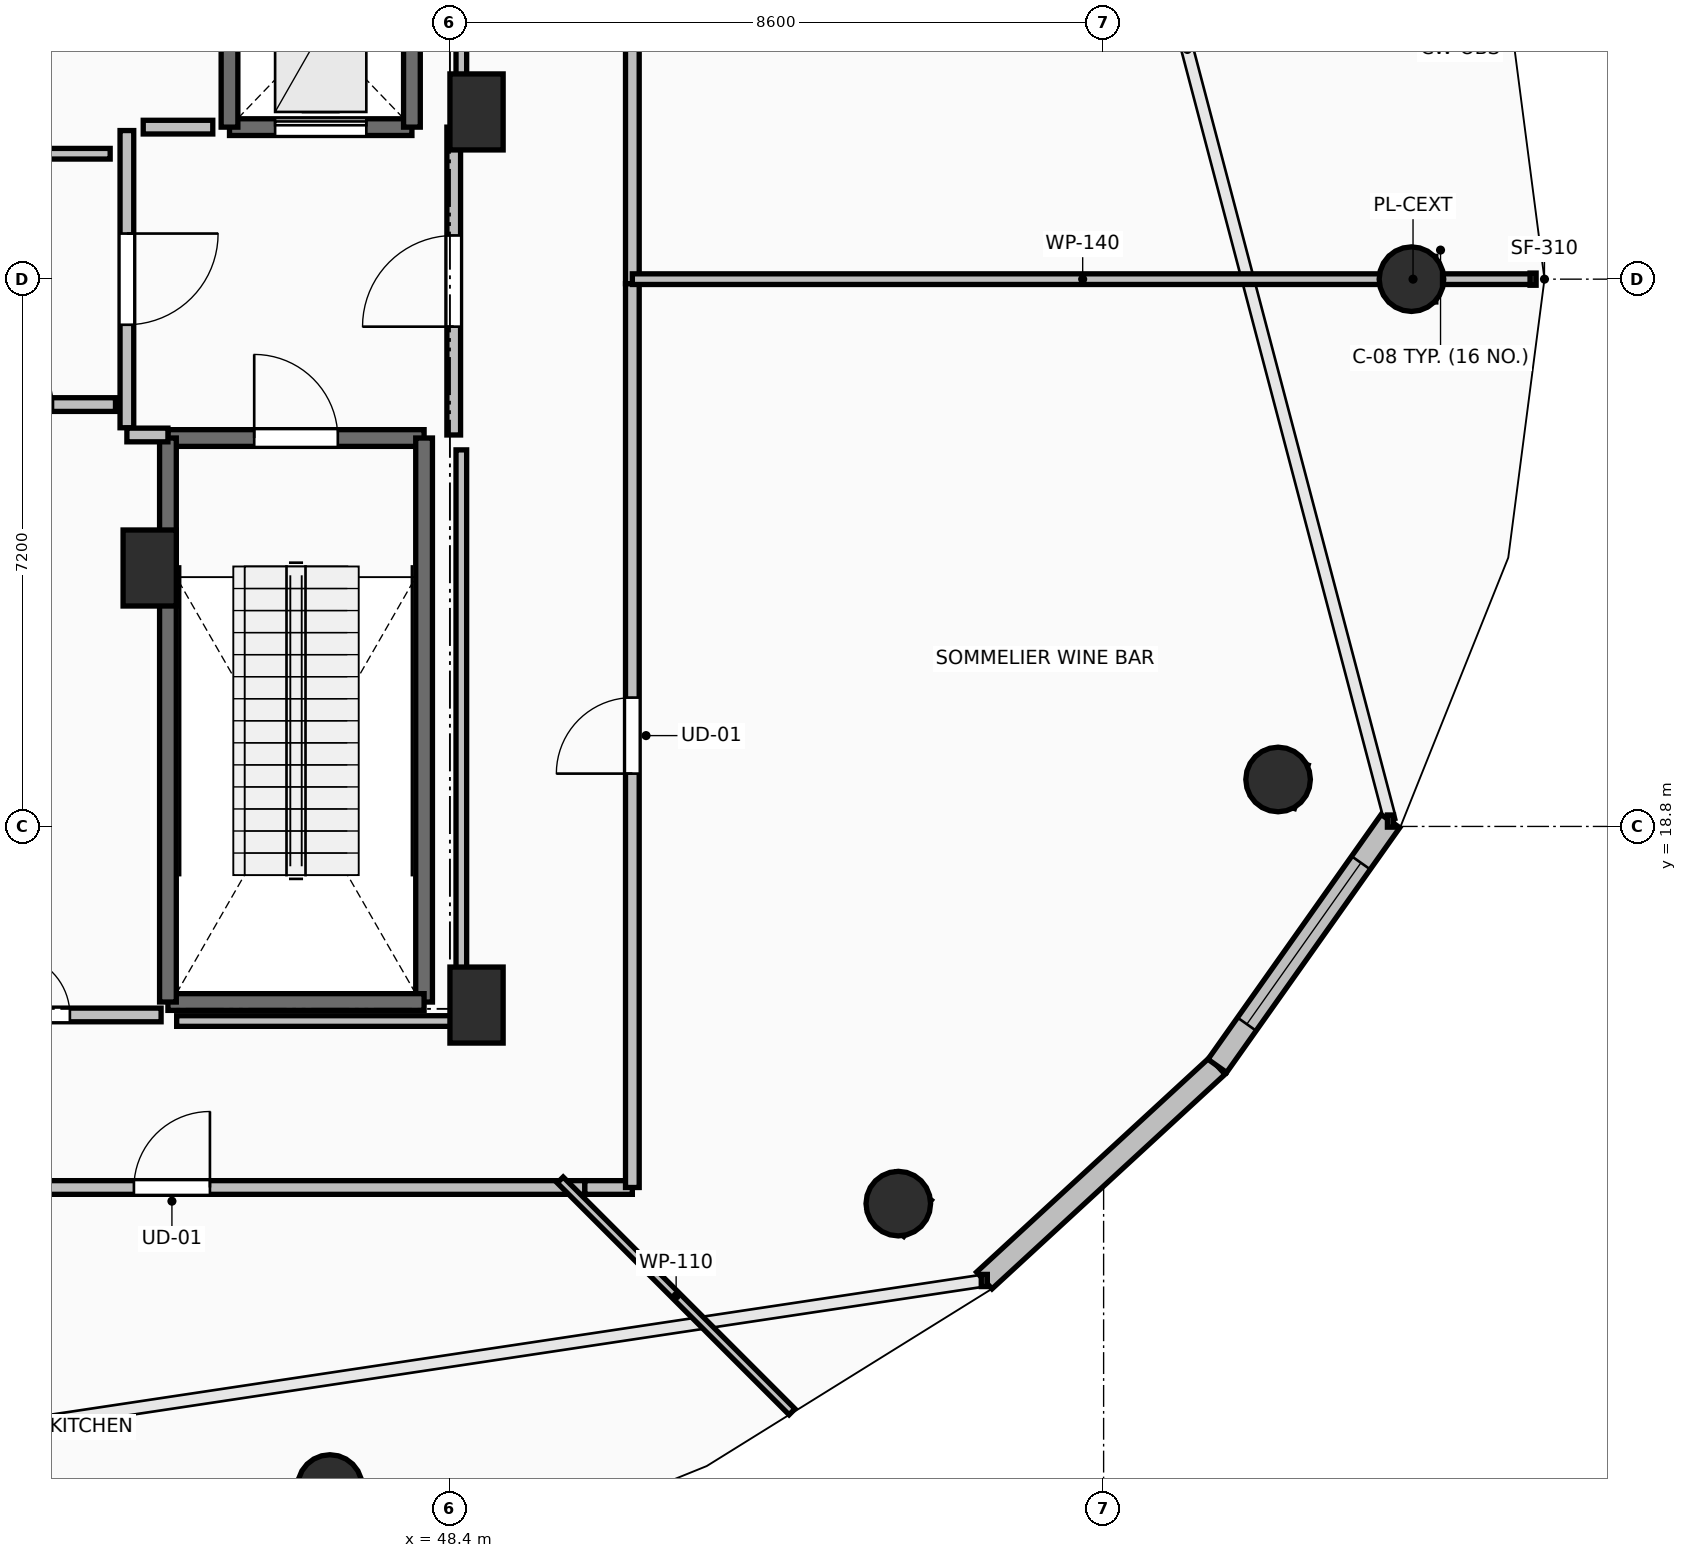
"""IFC4 building model, lengths in metres.
Left out: names, types, materials, properties, quantities, classifications, styles, units other than length and angle.
Written with IfcOpenShell. Run it as: python <this file> out.ifc"""

import sys

from ifc_helpers import new_model, si_unit, direction, frame, frame_2d, origin, origin_2d, place, context, subcontext, project, spatial, rectangle, circle, extrude, element, fill, save


model = new_model("IFC4")
c1 = context("Model", 3, precision=1e-05, world=origin(), true_north=direction((0.0, 1.0)))
c2 = subcontext(c1, "Body", "Model", "MODEL_VIEW")
j1 = project(units=[si_unit("LENGTHUNIT", "METRE"), si_unit("PLANEANGLEUNIT", "RADIAN")], contexts=[c1])
p1 = place(None, origin())
s1 = spatial("IfcSite", under=j1, at=p1, CompositionType="ELEMENT")
p2 = place(p1, origin())
s2 = spatial("IfcBuilding", under=s1, at=p2, CompositionType="ELEMENT")
p3 = place(p2, frame((0.0, 0.0, 290.4)))
s3 = spatial("IfcBuildingStorey", under=s2, at=p3, CompositionType="ELEMENT", Elevation=290.4)
for number, where, z_axis, x_axis in (
    (1, (61.05, 26.0, 0.0), (0.0, 0.0, 1.0), (1.0, 0.0, 0.0)),
    (2, (46.821, 10.109, 0.0), (0.0, 0.0, 1.0), (0.383, -0.924, 0.0)),
    (3, (54.299, 13.838, 0.0), (0.0, 0.0, 1.0), (0.707, -0.707, 0.0)),
    (4, (59.295, 19.418, 0.0), (0.0, 0.0, 1.0), (0.924, -0.383, 0.0)),
):
    element("IfcColumn", number, at=place(p3, frame(where, z_axis=z_axis, x_axis=x_axis)), inside=s3, PredefinedType="COLUMN", context=c2, shape_type="SweptSolid", body=[
        extrude(circle(Radius=0.425, at=origin_2d()), origin(), (0.0, 0.0, 1.0), 5.0),
    ])
for number, where, z_axis, x_axis in (
    (5, (48.75, 28.2, 0.0), (0.0, 0.0, 1.0), (1.0, 0.0, 0.0)),
    (6, (48.75, 16.45, 0.0), (0.0, 0.0, 1.0), (1.0, 0.0, 0.0)),
    (7, (44.45, 22.2, 0.0), (0.0, 0.0, 1.0), (1.0, 0.0, 0.0)),
):
    element("IfcColumn", number, at=place(p3, frame(where, z_axis=z_axis, x_axis=x_axis)), inside=s3, PredefinedType="PILASTER", context=c2, shape_type="SweptSolid", body=[
        extrude(rectangle(XDim=0.7, YDim=1.0, at=origin_2d()), origin(), (0.0, 0.0, 1.0), 5.0),
    ])
p4 = place(p3, frame((55.43, 12.827, 0.0), z_axis=(0.0, 0.0, 1.0), x_axis=(0.735595808164, 0.677420701641, 0.0)))
e8 = element("IfcWall", 8, at=p4, inside=s3, PredefinedType="STANDARD", context=c2, shape_type="SweptSolid", body=[
    extrude(rectangle(XDim=4.167, YDim=0.3, at=frame_2d((2.083, 0.0))), origin(), (0.0, 0.0, 1.0), 4.72),
])
p5 = place(p3, frame((58.496, 15.65, 0.0), z_axis=(0.0, 0.0, 1.0), x_axis=(0.577438563223, 0.816434140457, 0.0)))
e9 = element("IfcWall", 9, at=p5, inside=s3, PredefinedType="STANDARD", context=c2, shape_type="SweptSolid", body=[
    extrude(rectangle(XDim=3.945, YDim=0.3, at=frame_2d((1.973, 0.0))), origin(), (0.0, 0.0, 1.0), 4.72),
])
p6 = place(p5, frame((0.673, 0.0, 0.85)))
e10 = element("IfcOpeningElement", 10, at=p6, cuts=e9, PredefinedType="OPENING", context=c2, shape_type="SweptSolid", body=[
    extrude(rectangle(XDim=2.6, YDim=2.5, at=frame_2d((1.3, 1.25))), frame((0.0, 0.165, 0.0), z_axis=(0.0, -1.0, 0.0), x_axis=(1.0, 0.0, 0.0)), (0.0, 0.0, 1.0), 0.33),
])
p7 = place(p3, frame((44.69, 23.91, 0.0), z_axis=(0.0, 0.0, 1.0), x_axis=(1.0, 0.0, 0.0)))
e11 = element("IfcWall", 11, at=p7, inside=s3, PredefinedType="SOLIDWALL", context=c2, shape_type="SweptSolid", body=[
    extrude(rectangle(XDim=3.37, YDim=0.22, at=frame_2d((1.685, 0.0))), origin(), (0.0, 0.0, 1.0), 4.72),
])
p8 = place(p7, frame((1.135, 0.0, 0.0)))
e12 = element("IfcOpeningElement", 12, at=p8, cuts=e11, PredefinedType="OPENING", context=c2, shape_type="SweptSolid", body=[
    extrude(rectangle(XDim=1.1, YDim=2.15, at=frame_2d((0.55, 1.075))), frame((0.0, 0.125, 0.0), z_axis=(0.0, -1.0, 0.0), x_axis=(1.0, 0.0, 0.0)), (0.0, 0.0, 1.0), 0.25),
])
p9 = place(p3, frame((48.06, 23.91, 0.0), z_axis=(0.0, 0.0, 1.0), x_axis=(0.0, -1.0, 0.0)))
e13 = element("IfcWall", 13, at=p9, inside=s3, PredefinedType="SOLIDWALL", context=c2, shape_type="SweptSolid", body=[
    extrude(rectangle(XDim=7.42, YDim=0.22, at=frame_2d((3.71, 0.0))), origin(), (0.0, 0.0, 1.0), 4.72),
])
p10 = place(p3, frame((48.06, 16.49, 0.0), z_axis=(0.0, 0.0, 1.0), x_axis=(-1.0, 0.0, 0.0)))
e14 = element("IfcWall", 14, at=p10, inside=s3, PredefinedType="SOLIDWALL", context=c2, shape_type="SweptSolid", body=[
    extrude(rectangle(XDim=3.37, YDim=0.22, at=frame_2d((1.685, 0.0))), origin(), (0.0, 0.0, 1.0), 4.72),
])
p11 = place(p3, frame((44.69, 16.49, 0.0), z_axis=(0.0, 0.0, 1.0), x_axis=(0.0, 1.0, 0.0)))
e15 = element("IfcWall", 15, at=p11, inside=s3, PredefinedType="SOLIDWALL", context=c2, shape_type="SweptSolid", body=[
    extrude(rectangle(XDim=7.42, YDim=0.22, at=frame_2d((3.71, 0.0))), origin(), (0.0, 0.0, 1.0), 4.72),
])
p12 = place(p3, frame((45.5, 28.0, 0.0), z_axis=(0.0, 0.0, 1.0), x_axis=(1.0, 0.0, 0.0)))
e16 = element("IfcWall", 16, at=p12, inside=s3, PredefinedType="SHEAR", context=c2, shape_type="SweptSolid", body=[
    extrude(rectangle(XDim=2.4, YDim=0.22, at=frame_2d((1.2, 0.0))), origin(), (0.0, 0.0, 1.0), 4.72),
])
p13 = place(p12, frame((0.6, 0.0, 0.0)))
e17 = element("IfcOpeningElement", 17, at=p13, cuts=e16, PredefinedType="OPENING", context=c2, shape_type="SweptSolid", body=[
    extrude(rectangle(XDim=1.2, YDim=2.2, at=frame_2d((0.6, 1.1))), frame((0.0, 0.125, 0.0), z_axis=(0.0, -1.0, 0.0), x_axis=(1.0, 0.0, 0.0)), (0.0, 0.0, 1.0), 0.25),
])
for number, where, z_axis, x_axis in (
    (18, (47.9, 28.0, 0.0), (0.0, 0.0, 1.0), (0.0, 1.0, 0.0)),
    (19, (45.5, 30.5, 0.0), (0.0, 0.0, 1.0), (0.0, -1.0, 0.0)),
):
    element("IfcWall", number, at=place(p3, frame(where, z_axis=z_axis, x_axis=x_axis)), inside=s3, PredefinedType="SHEAR", context=c2, shape_type="SweptSolid", body=[
        extrude(rectangle(XDim=2.5, YDim=0.22, at=frame_2d((1.25, 0.0))), origin(), (0.0, 0.0, 1.0), 4.72),
    ])
p14 = place(p3, frame((44.15, 27.955, 0.0), z_axis=(0.0, 0.0, 1.0), x_axis=(0.0, -1.0, 0.0)))
e20 = element("IfcWall", 20, at=p14, inside=s3, PredefinedType="PARTITIONING", context=c2, shape_type="SweptSolid", body=[
    extrude(rectangle(XDim=3.91, YDim=0.18, at=frame_2d((1.955, 0.0))), origin(), (0.0, 0.0, 1.0), 4.72),
])
p15 = place(p14, frame((1.355, 0.0, 0.0)))
e21 = element("IfcOpeningElement", 21, at=p15, cuts=e20, PredefinedType="OPENING", context=c2, shape_type="SweptSolid", body=[
    extrude(rectangle(XDim=1.2, YDim=2.15, at=frame_2d((0.6, 1.075))), frame((0.0, 0.105, 0.0), z_axis=(0.0, -1.0, 0.0), x_axis=(1.0, 0.0, 0.0)), (0.0, 0.0, 1.0), 0.21),
])
p16 = place(p3, frame((44.15, 23.95, 0.0), z_axis=(0.0, 0.0, 1.0), x_axis=(1.0, 0.0, 0.0)))
e22 = element("IfcWall", 22, at=p16, inside=s3, PredefinedType="PARTITIONING", context=c2, shape_type="SweptSolid", body=[
    extrude(rectangle(XDim=0.54, YDim=0.18, at=frame_2d((0.27, 0.0))), origin(), (0.0, 0.0, 1.0), 4.72),
])
p17 = place(p3, frame((48.45, 23.95, 0.0), z_axis=(0.0, 0.0, 1.0), x_axis=(0.0, 1.0, 0.0)))
e23 = element("IfcWall", 23, at=p17, inside=s3, PredefinedType="PARTITIONING", context=c2, shape_type="SweptSolid", body=[
    extrude(rectangle(XDim=4.05, YDim=0.18, at=frame_2d((2.025, 0.0))), origin(), (0.0, 0.0, 1.0), 4.72),
])
p18 = place(p17, frame((1.425, 0.0, 0.0)))
e24 = element("IfcOpeningElement", 24, at=p18, cuts=e23, PredefinedType="OPENING", context=c2, shape_type="SweptSolid", body=[
    extrude(rectangle(XDim=1.2, YDim=2.15, at=frame_2d((0.6, 1.075))), frame((0.0, 0.105, 0.0), z_axis=(0.0, -1.0, 0.0), x_axis=(1.0, 0.0, 0.0)), (0.0, 0.0, 1.0), 0.21),
])
p19 = place(p3, frame((41.555, 24.35, 0.0), z_axis=(0.0, 0.0, 1.0), x_axis=(1.0, 0.0, 0.0)))
e25 = element("IfcWall", 25, at=p19, inside=s3, PredefinedType="PARTITIONING", context=c2, shape_type="SweptSolid", body=[
    extrude(rectangle(XDim=2.445, YDim=0.18, at=frame_2d((1.223, 0.0))), origin(), (0.0, 0.0, 1.0), 4.72),
])
p20 = place(p19, frame((0.823, 0.0, 0.0)))
e26 = element("IfcOpeningElement", 26, at=p20, cuts=e25, PredefinedType="OPENING", context=c2, shape_type="SweptSolid", body=[
    extrude(rectangle(XDim=0.8, YDim=2.05, at=frame_2d((0.4, 1.025))), frame((0.0, 0.105, 0.0), z_axis=(0.0, -1.0, 0.0), x_axis=(1.0, 0.0, 0.0)), (0.0, 0.0, 1.0), 0.21),
])
p21 = place(p3, frame((41.4, 16.32, 0.0), z_axis=(0.0, 0.0, 1.0), x_axis=(1.0, 0.0, 0.0)))
e27 = element("IfcWall", 27, at=p21, inside=s3, PredefinedType="PARTITIONING", context=c2, shape_type="SweptSolid", body=[
    extrude(rectangle(XDim=3.2, YDim=0.18, at=frame_2d((1.6, 0.0))), origin(), (0.0, 0.0, 1.0), 4.72),
])
p22 = place(p21, frame((1.2, 0.0, 0.0)))
e28 = element("IfcOpeningElement", 28, at=p22, cuts=e27, PredefinedType="OPENING", context=c2, shape_type="SweptSolid", body=[
    extrude(rectangle(XDim=0.8, YDim=2.05, at=frame_2d((0.4, 1.025))), frame((0.0, 0.105, 0.0), z_axis=(0.0, -1.0, 0.0), x_axis=(1.0, 0.0, 0.0)), (0.0, 0.0, 1.0), 0.21),
])
p23 = place(p3, frame((50.8, 25.94, 0.0), z_axis=(0.0, 0.0, 1.0), x_axis=(0.0, 1.0, 0.0)))
e29 = element("IfcWall", 29, at=p23, inside=s3, PredefinedType="PARTITIONING", context=c2, shape_type="SweptSolid", body=[
    extrude(rectangle(XDim=10.01, YDim=0.18, at=frame_2d((5.005, 0.0))), origin(), (0.0, 0.0, 1.0), 3.912),
])
p24 = place(p3, frame((39.31, 14.05, 0.0), z_axis=(0.0, 0.0, 1.0), x_axis=(1.0, 0.0, 0.0)))
e30 = element("IfcWall", 30, at=p24, inside=s3, PredefinedType="PARTITIONING", context=c2, shape_type="SweptSolid", body=[
    extrude(rectangle(XDim=10.865, YDim=0.18, at=frame_2d((5.433, 0.0))), origin(), (0.0, 0.0, 1.0), 3.912),
])
p25 = place(p24, frame((4.933, 0.0, 0.0)))
e31 = element("IfcOpeningElement", 31, at=p25, cuts=e30, PredefinedType="OPENING", context=c2, shape_type="SweptSolid", body=[
    extrude(rectangle(XDim=1.0, YDim=2.15, at=frame_2d((0.5, 1.075))), frame((0.0, 0.105, 0.0), z_axis=(0.0, -1.0, 0.0), x_axis=(1.0, 0.0, 0.0)), (0.0, 0.0, 1.0), 0.21),
])
p26 = place(p3, frame((50.175, 14.05, 0.0), z_axis=(0.0, 0.0, 1.0), x_axis=(1.0, 0.0, 0.0)))
e32 = element("IfcWall", 32, at=p26, inside=s3, PredefinedType="PARTITIONING", context=c2, shape_type="SweptSolid", body=[
    extrude(rectangle(XDim=0.625, YDim=0.18, at=frame_2d((0.312, 0.0))), origin(), (0.0, 0.0, 1.0), 4.409),
])
p27 = place(p3, frame((50.8, 14.05, 0.0), z_axis=(0.0, 0.0, 1.0), x_axis=(0.0, 1.0, 0.0)))
e33 = element("IfcWall", 33, at=p27, inside=s3, PredefinedType="PARTITIONING", context=c2, shape_type="SweptSolid", body=[
    extrude(rectangle(XDim=11.89, YDim=0.18, at=frame_2d((5.945, 0.0))), origin(), (0.0, 0.0, 1.0), 3.912),
])
p28 = place(p27, frame((5.445, 0.0, 0.0)))
e34 = element("IfcOpeningElement", 34, at=p28, cuts=e33, PredefinedType="OPENING", context=c2, shape_type="SweptSolid", body=[
    extrude(rectangle(XDim=1.0, YDim=2.15, at=frame_2d((0.5, 1.075))), frame((0.0, 0.105, 0.0), z_axis=(0.0, -1.0, 0.0), x_axis=(1.0, 0.0, 0.0)), (0.0, 0.0, 1.0), 0.21),
])
p29 = place(p3, frame((50.8, 26.0, 0.0), z_axis=(0.0, 0.0, 1.0), x_axis=(1.0, 0.0, 0.0)))
e35 = element("IfcWall", 35, at=p29, inside=s3, PredefinedType="PARTITIONING", context=c2, shape_type="SweptSolid", body=[
    extrude(rectangle(XDim=11.849, YDim=0.14, at=frame_2d((5.924, 0.0))), origin(), (0.0, 0.0, 1.0), 3.912),
])
p30 = place(p3, frame((52.901, 11.099, 0.0), z_axis=(0.0, 0.0, 1.0), x_axis=(-0.707106781187, 0.707106781187, 0.0)))
e36 = element("IfcWall", 36, at=p30, inside=s3, PredefinedType="PARTITIONING", context=c2, shape_type="SweptSolid", body=[
    extrude(rectangle(XDim=4.313, YDim=0.11, at=frame_2d((2.156, 0.0))), origin(), (0.0, 0.0, 1.0), 4.304),
])
p31 = place(p3, frame((45.28, 28.0, 0.0), z_axis=(0.0, 0.0, 1.0), x_axis=(-1.0, 0.0, 0.0)))
e37 = element("IfcWall", 37, at=p31, inside=s3, PredefinedType="PARTITIONING", context=c2, shape_type="SweptSolid", body=[
    extrude(rectangle(XDim=0.915, YDim=0.18, at=frame_2d((0.458, 0.0))), origin(), (0.0, 0.0, 1.0), 4.72),
])
p32 = place(p3, frame((43.93, 27.65, 0.0), z_axis=(0.0, 0.0, 1.0), x_axis=(-1.0, 0.0, 0.0)))
e38 = element("IfcWall", 38, at=p32, inside=s3, PredefinedType="PARTITIONING", context=c2, shape_type="SweptSolid", body=[
    extrude(rectangle(XDim=4.52, YDim=0.14, at=frame_2d((2.26, 0.0))), origin(), (0.0, 0.0, 1.0), 4.72),
])
p33 = place(p3, frame((44.805, 16.24, 0.0), z_axis=(0.0, 0.0, 1.0), x_axis=(1.0, 0.0, 0.0)))
e39 = element("IfcWall", 39, at=p33, inside=s3, PredefinedType="PARTITIONING", context=c2, shape_type="SweptSolid", body=[
    extrude(rectangle(XDim=3.745, YDim=0.14, at=frame_2d((1.873, 0.0))), origin(), (0.0, 0.0, 1.0), 3.912),
])
p34 = place(p3, frame((48.55, 16.24, 0.0), z_axis=(0.0, 0.0, 1.0), x_axis=(0.0, 1.0, 0.0)))
e40 = element("IfcWall", 40, at=p34, inside=s3, PredefinedType="PARTITIONING", context=c2, shape_type="SweptSolid", body=[
    extrude(rectangle(XDim=7.514, YDim=0.14, at=frame_2d((3.757, 0.0))), origin(), (0.0, 0.0, 1.0), 3.912),
])
p35 = place(p3, frame((48.55, 28.196, 0.0), z_axis=(0.0, 0.0, 1.0), x_axis=(0.0, 1.0, 0.0)))
e41 = element("IfcWall", 41, at=p35, inside=s3, PredefinedType="PARTITIONING", context=c2, shape_type="SweptSolid", body=[
    extrude(rectangle(XDim=5.254, YDim=0.14, at=frame_2d((2.627, 0.0))), origin(), (0.0, 0.0, 1.0), 3.912),
])
p36 = place(p6, origin())
e42 = element("IfcWindow", 42, at=p36, inside=s3, PartitioningType="SINGLE_PANEL", PredefinedType="WINDOW", context=c2, shape_type="SweptSolid", body=[
    extrude(rectangle(XDim=2.6, YDim=2.5, at=frame_2d((1.3, 1.25))), frame((0.0, 0.03, 0.0), z_axis=(0.0, -1.0, 0.0), x_axis=(1.0, 0.0, 0.0)), (0.0, 0.0, 1.0), 0.06),
])
fill(e10, e42)
p37 = place(p8, origin())
e43 = element("IfcDoor", 43, at=p37, inside=s3, OperationType="SINGLE_SWING_LEFT", PredefinedType="DOOR", context=c2, shape_type="SweptSolid", body=[
    extrude(rectangle(XDim=1.1, YDim=2.15, at=frame_2d((0.55, 1.075))), frame((0.0, 0.025, 0.0), z_axis=(0.0, -1.0, 0.0), x_axis=(1.0, 0.0, 0.0)), (0.0, 0.0, 1.0), 0.05),
])
fill(e12, e43)
p38 = place(p13, origin())
e44 = element("IfcDoor", 44, at=p38, inside=s3, OperationType="SLIDING_TO_LEFT", PredefinedType="DOOR", context=c2, shape_type="SweptSolid", body=[
    extrude(rectangle(XDim=1.2, YDim=2.2, at=frame_2d((0.6, 1.1))), frame((0.0, 0.025, 0.0), z_axis=(0.0, -1.0, 0.0), x_axis=(1.0, 0.0, 0.0)), (0.0, 0.0, 1.0), 0.05),
])
fill(e17, e44)
p39 = place(p15, origin())
e45 = element("IfcDoor", 45, at=p39, inside=s3, OperationType="SINGLE_SWING_LEFT", PredefinedType="DOOR", context=c2, shape_type="SweptSolid", body=[
    extrude(rectangle(XDim=1.2, YDim=2.15, at=frame_2d((0.6, 1.075))), frame((0.0, 0.025, 0.0), z_axis=(0.0, -1.0, 0.0), x_axis=(1.0, 0.0, 0.0)), (0.0, 0.0, 1.0), 0.05),
])
fill(e21, e45)
p40 = place(p18, origin())
e46 = element("IfcDoor", 46, at=p40, inside=s3, OperationType="SINGLE_SWING_LEFT", PredefinedType="DOOR", context=c2, shape_type="SweptSolid", body=[
    extrude(rectangle(XDim=1.2, YDim=2.15, at=frame_2d((0.6, 1.075))), frame((0.0, 0.025, 0.0), z_axis=(0.0, -1.0, 0.0), x_axis=(1.0, 0.0, 0.0)), (0.0, 0.0, 1.0), 0.05),
])
fill(e24, e46)
p41 = place(p20, origin())
e47 = element("IfcDoor", 47, at=p41, inside=s3, OperationType="SINGLE_SWING_LEFT", PredefinedType="DOOR", context=c2, shape_type="SweptSolid", body=[
    extrude(rectangle(XDim=0.8, YDim=2.05, at=frame_2d((0.4, 1.025))), frame((0.0, 0.025, 0.0), z_axis=(0.0, -1.0, 0.0), x_axis=(1.0, 0.0, 0.0)), (0.0, 0.0, 1.0), 0.05),
])
fill(e26, e47)
p42 = place(p22, origin())
e48 = element("IfcDoor", 48, at=p42, inside=s3, OperationType="SINGLE_SWING_LEFT", PredefinedType="DOOR", context=c2, shape_type="SweptSolid", body=[
    extrude(rectangle(XDim=0.8, YDim=2.05, at=frame_2d((0.4, 1.025))), frame((0.0, 0.025, 0.0), z_axis=(0.0, -1.0, 0.0), x_axis=(1.0, 0.0, 0.0)), (0.0, 0.0, 1.0), 0.05),
])
fill(e28, e48)
p43 = place(p25, origin())
e49 = element("IfcDoor", 49, at=p43, inside=s3, OperationType="SINGLE_SWING_RIGHT", PredefinedType="DOOR", context=c2, shape_type="SweptSolid", body=[
    extrude(rectangle(XDim=1.0, YDim=2.15, at=frame_2d((0.5, 1.075))), frame((0.0, 0.025, 0.0), z_axis=(0.0, -1.0, 0.0), x_axis=(1.0, 0.0, 0.0)), (0.0, 0.0, 1.0), 0.05),
])
fill(e31, e49)
p44 = place(p28, origin())
e50 = element("IfcDoor", 50, at=p44, inside=s3, OperationType="SINGLE_SWING_LEFT", PredefinedType="DOOR", context=c2, shape_type="SweptSolid", body=[
    extrude(rectangle(XDim=1.0, YDim=2.15, at=frame_2d((0.5, 1.075))), frame((0.0, 0.025, 0.0), z_axis=(0.0, -1.0, 0.0), x_axis=(1.0, 0.0, 0.0)), (0.0, 0.0, 1.0), 0.05),
])
fill(e34, e50)
save(model, sys.argv[1])
